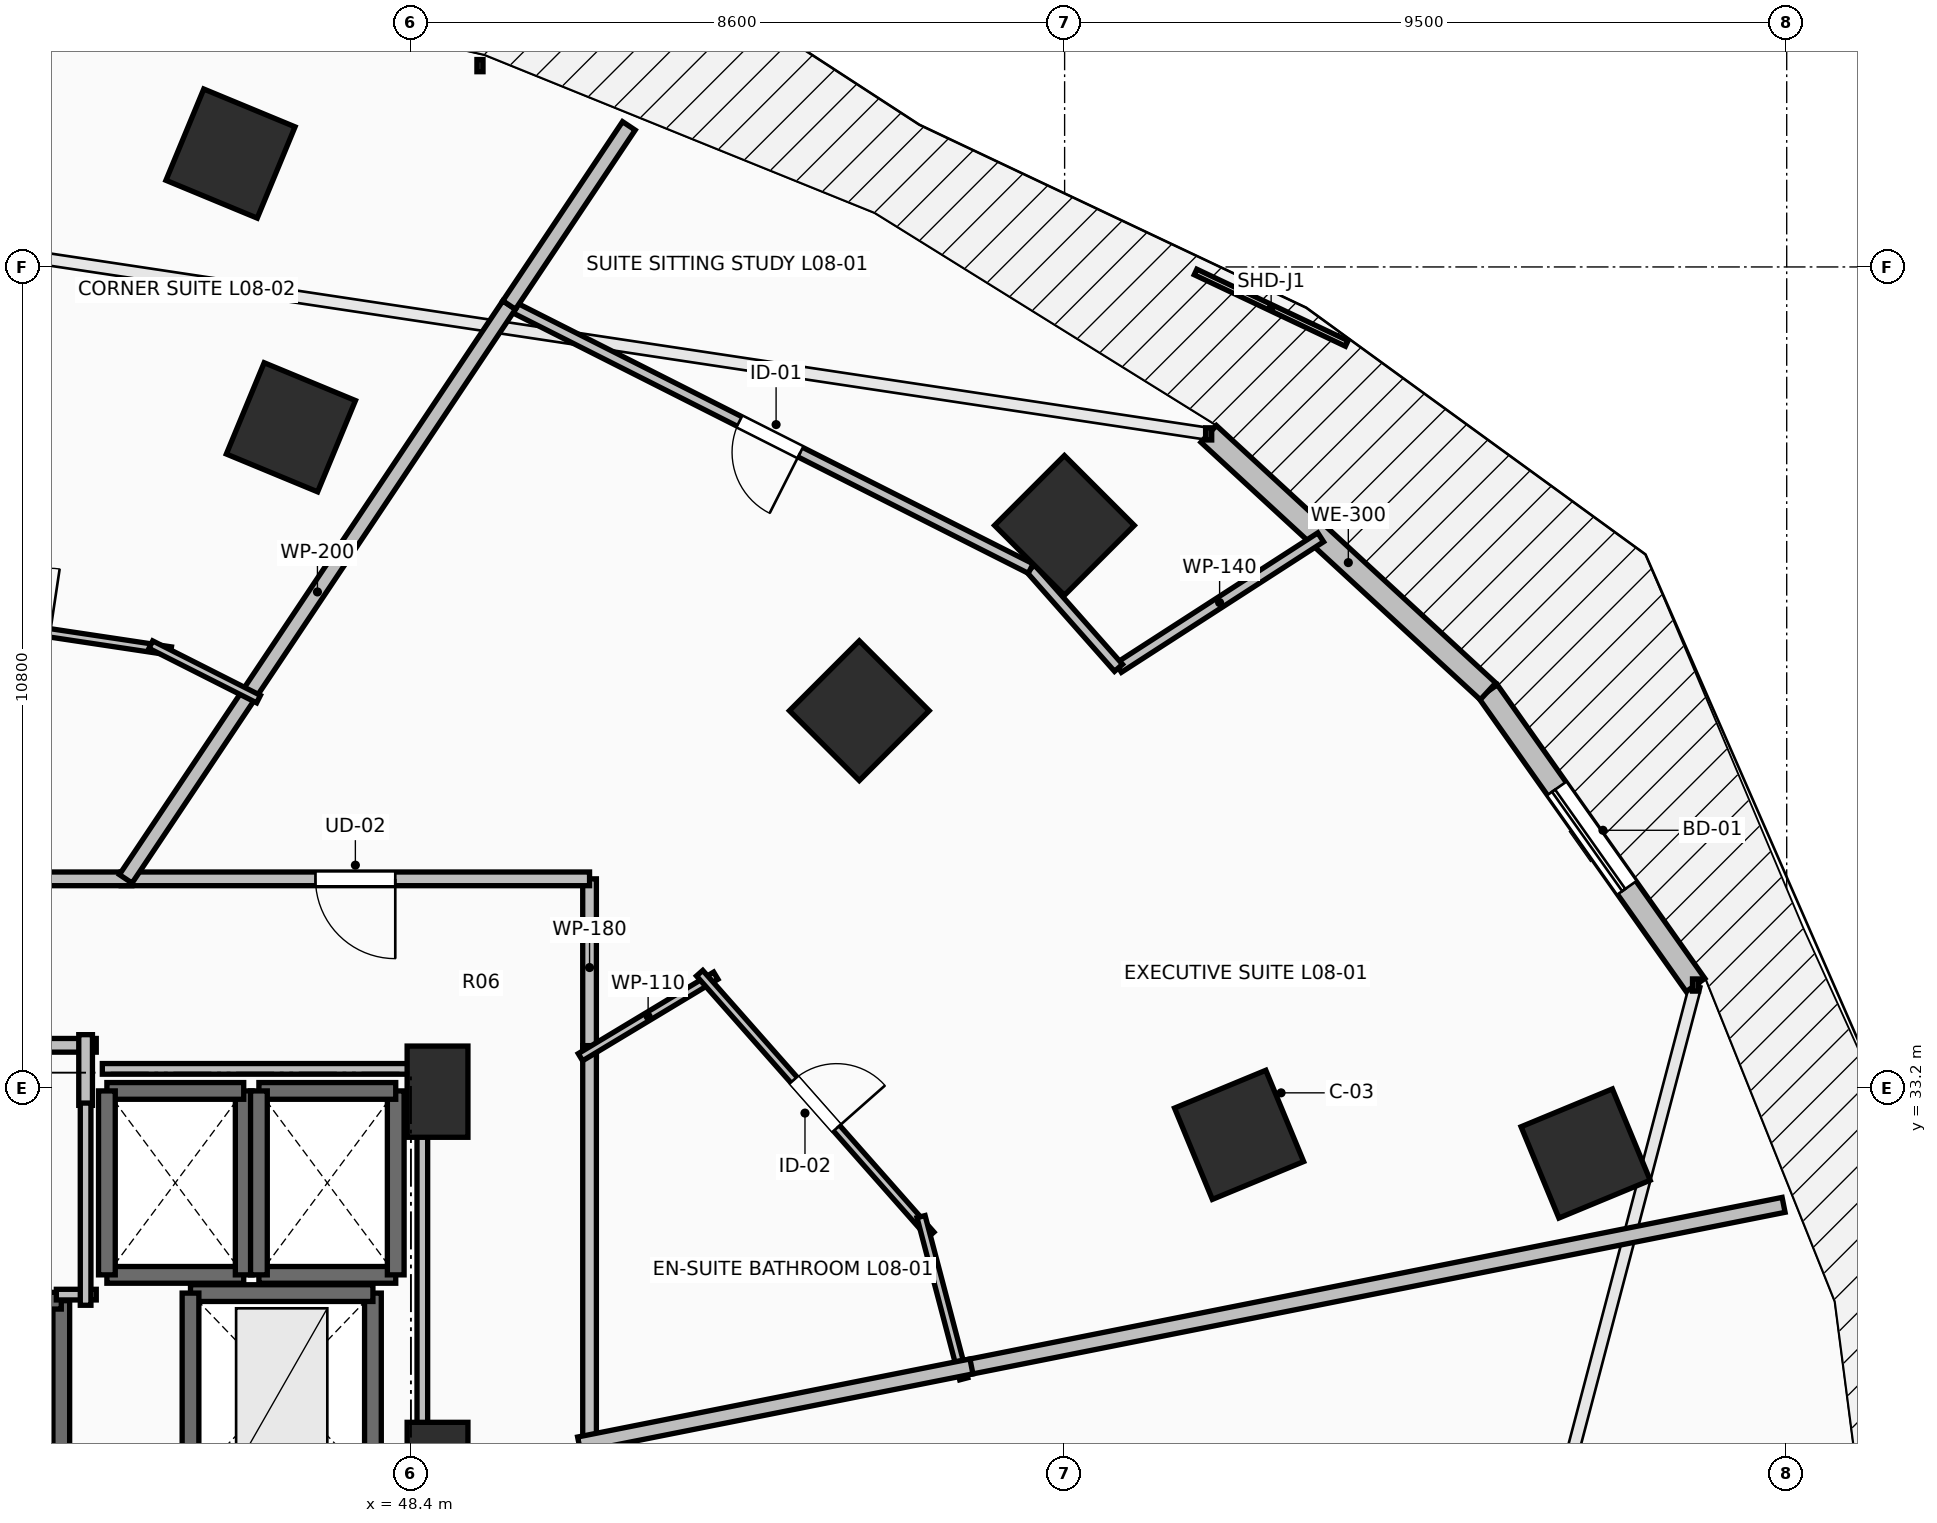
"""IFC4 building model, lengths in metres.
Left out: names, types, materials, properties, quantities, classifications, styles, units other than length and angle.
Written with IfcOpenShell. Run it as: python <this file> out.ifc"""

import sys

from ifc_helpers import new_model, si_unit, direction, frame, frame_2d, origin, origin_2d, place, context, subcontext, project, spatial, rectangle, extrude, element, fill, save


model = new_model("IFC4")
c1 = context("Model", 3, precision=1e-05, world=origin(), true_north=direction((0.0, 1.0)))
c2 = subcontext(c1, "Body", "Model", "MODEL_VIEW")
j1 = project(units=[si_unit("LENGTHUNIT", "METRE"), si_unit("PLANEANGLEUNIT", "RADIAN")], contexts=[c1])
p1 = place(None, origin())
s1 = spatial("IfcSite", under=j1, at=p1, CompositionType="ELEMENT")
p2 = place(p1, origin())
s2 = spatial("IfcBuilding", under=s1, at=p2, CompositionType="ELEMENT")
p3 = place(p2, frame((0.0, 0.0, 34.5)))
s3 = spatial("IfcBuildingStorey", under=s2, at=p3, CompositionType="ELEMENT", Elevation=34.5)
for number, where, z_axis, x_axis in (
    (1, (59.295, 32.582, 0.0), (0.0, 0.0, 1.0), (0.924, 0.383, 0.0)),
    (2, (54.299, 38.162, 0.0), (0.0, 0.0, 1.0), (0.707, 0.707, 0.0)),
    (3, (46.821, 41.891, 0.0), (0.0, 0.0, 1.0), (0.383, 0.924, 0.0)),
    (4, (63.854, 32.337, 0.0), (0.0, 0.0, 1.0), (0.924, 0.383, 0.0)),
    (5, (56.997, 40.6, 0.0), (0.0, 0.0, 1.0), (0.707, 0.707, 0.0)),
    (6, (46.026, 45.492, 0.0), (0.0, 0.0, 1.0), (0.383, 0.924, 0.0)),
):
    element("IfcColumn", number, at=place(p3, frame(where, z_axis=z_axis, x_axis=x_axis)), inside=s3, PredefinedType="COLUMN", context=c2, shape_type="SweptSolid", body=[
        extrude(rectangle(XDim=1.3, YDim=1.3, at=origin_2d()), origin(), (0.0, 0.0, 1.0), 3.5),
    ])
for number, where, z_axis, x_axis in (
    (7, (48.75, 33.15, 0.0), (0.0, 0.0, 1.0), (1.0, 0.0, 0.0)),
    (8, (48.75, 28.2, 0.0), (0.0, 0.0, 1.0), (1.0, 0.0, 0.0)),
):
    element("IfcColumn", number, at=place(p3, frame(where, z_axis=z_axis, x_axis=x_axis)), inside=s3, PredefinedType="PILASTER", context=c2, shape_type="SweptSolid", body=[
        extrude(rectangle(XDim=0.8, YDim=1.2, at=origin_2d()), origin(), (0.0, 0.0, 1.0), 3.5),
    ])
p4 = place(p3, frame((65.301, 34.553, 0.0), z_axis=(0.0, 0.0, 1.0), x_axis=(-0.577130815624, 0.816651713803, 0.0)))
e9 = element("IfcWall", 9, at=p4, inside=s3, PredefinedType="STANDARD", context=c2, shape_type="SweptSolid", body=[
    extrude(rectangle(XDim=4.731, YDim=0.3, at=frame_2d((2.366, 0.0))), origin(), (0.0, 0.0, 1.0), 3.24),
])
p5 = place(p4, frame((1.566, 0.0, 0.0)))
e10 = element("IfcOpeningElement", 10, at=p5, cuts=e9, PredefinedType="OPENING", context=c2, shape_type="SweptSolid", body=[
    extrude(rectangle(XDim=1.6, YDim=2.3, at=frame_2d((0.8, 1.15))), frame((0.0, 0.165, 0.0), z_axis=(0.0, -1.0, 0.0), x_axis=(1.0, 0.0, 0.0)), (0.0, 0.0, 1.0), 0.33),
])
p6 = place(p3, frame((62.57, 38.417, 0.0), z_axis=(0.0, 0.0, 1.0), x_axis=(-0.735342629635, 0.677695519419, 0.0)))
e11 = element("IfcWall", 11, at=p6, inside=s3, PredefinedType="STANDARD", context=c2, shape_type="SweptSolid", body=[
    extrude(rectangle(XDim=4.997, YDim=0.3, at=frame_2d((2.499, 0.0))), origin(), (0.0, 0.0, 1.0), 3.24),
])
p7 = place(p3, frame((43.8, 27.8, 0.0), z_axis=(0.0, 0.0, 1.0), x_axis=(0.0, 1.0, 0.0)))
e12 = element("IfcWall", 12, at=p7, inside=s3, PredefinedType="SOLIDWALL", context=c2, shape_type="SweptSolid", body=[
    extrude(rectangle(XDim=2.6, YDim=0.22, at=frame_2d((1.3, 0.0))), origin(), (0.0, 0.0, 1.0), 3.24),
])
p8 = place(p3, frame((43.8, 30.4, 0.0), z_axis=(0.0, 0.0, 1.0), x_axis=(-1.0, 0.0, 0.0)))
e13 = element("IfcWall", 13, at=p8, inside=s3, PredefinedType="SOLIDWALL", context=c2, shape_type="SweptSolid", body=[
    extrude(rectangle(XDim=2.2, YDim=0.22, at=frame_2d((1.1, 0.0))), origin(), (0.0, 0.0, 1.0), 3.24),
])
p9 = place(p3, frame((44.4, 30.74, 0.0), z_axis=(0.0, 0.0, 1.0), x_axis=(1.0, 0.0, 0.0)))
e14 = element("IfcWall", 14, at=p9, inside=s3, PredefinedType="SOLIDWALL", context=c2, shape_type="SweptSolid", body=[
    extrude(rectangle(XDim=1.8, YDim=0.22, at=frame_2d((0.9, 0.0))), origin(), (0.0, 0.0, 1.0), 3.24),
])
p10 = place(p3, frame((46.2, 30.74, 0.0), z_axis=(0.0, 0.0, 1.0), x_axis=(0.0, 1.0, 0.0)))
e15 = element("IfcWall", 15, at=p10, inside=s3, PredefinedType="SOLIDWALL", context=c2, shape_type="SweptSolid", body=[
    extrude(rectangle(XDim=2.42, YDim=0.22, at=frame_2d((1.21, 0.0))), origin(), (0.0, 0.0, 1.0), 3.24),
])
p11 = place(p3, frame((46.2, 33.16, 0.0), z_axis=(0.0, 0.0, 1.0), x_axis=(-1.0, 0.0, 0.0)))
e16 = element("IfcWall", 16, at=p11, inside=s3, PredefinedType="SOLIDWALL", context=c2, shape_type="SweptSolid", body=[
    extrude(rectangle(XDim=1.8, YDim=0.22, at=frame_2d((0.9, 0.0))), origin(), (0.0, 0.0, 1.0), 3.24),
])
p12 = place(p3, frame((44.4, 33.16, 0.0), z_axis=(0.0, 0.0, 1.0), x_axis=(0.0, -1.0, 0.0)))
e17 = element("IfcWall", 17, at=p12, inside=s3, PredefinedType="SOLIDWALL", context=c2, shape_type="SweptSolid", body=[
    extrude(rectangle(XDim=2.42, YDim=0.22, at=frame_2d((1.21, 0.0))), origin(), (0.0, 0.0, 1.0), 3.24),
])
p13 = place(p3, frame((46.4, 30.74, 0.0), z_axis=(0.0, 0.0, 1.0), x_axis=(1.0, 0.0, 0.0)))
e18 = element("IfcWall", 18, at=p13, inside=s3, PredefinedType="SOLIDWALL", context=c2, shape_type="SweptSolid", body=[
    extrude(rectangle(XDim=1.8, YDim=0.22, at=frame_2d((0.9, 0.0))), origin(), (0.0, 0.0, 1.0), 3.24),
])
p14 = place(p3, frame((48.2, 30.74, 0.0), z_axis=(0.0, 0.0, 1.0), x_axis=(0.0, 1.0, 0.0)))
e19 = element("IfcWall", 19, at=p14, inside=s3, PredefinedType="SOLIDWALL", context=c2, shape_type="SweptSolid", body=[
    extrude(rectangle(XDim=2.42, YDim=0.22, at=frame_2d((1.21, 0.0))), origin(), (0.0, 0.0, 1.0), 3.24),
])
p15 = place(p3, frame((48.2, 33.16, 0.0), z_axis=(0.0, 0.0, 1.0), x_axis=(-1.0, 0.0, 0.0)))
e20 = element("IfcWall", 20, at=p15, inside=s3, PredefinedType="SOLIDWALL", context=c2, shape_type="SweptSolid", body=[
    extrude(rectangle(XDim=1.8, YDim=0.22, at=frame_2d((0.9, 0.0))), origin(), (0.0, 0.0, 1.0), 3.24),
])
p16 = place(p3, frame((46.4, 33.16, 0.0), z_axis=(0.0, 0.0, 1.0), x_axis=(0.0, -1.0, 0.0)))
e21 = element("IfcWall", 21, at=p16, inside=s3, PredefinedType="SOLIDWALL", context=c2, shape_type="SweptSolid", body=[
    extrude(rectangle(XDim=2.42, YDim=0.22, at=frame_2d((1.21, 0.0))), origin(), (0.0, 0.0, 1.0), 3.24),
])
p17 = place(p3, frame((47.9, 28.0, 0.0), z_axis=(0.0, 0.0, 1.0), x_axis=(0.0, 1.0, 0.0)))
e22 = element("IfcWall", 22, at=p17, inside=s3, PredefinedType="SHEAR", context=c2, shape_type="SweptSolid", body=[
    extrude(rectangle(XDim=2.5, YDim=0.22, at=frame_2d((1.25, 0.0))), origin(), (0.0, 0.0, 1.0), 3.24),
])
p18 = place(p3, frame((47.9, 30.5, 0.0), z_axis=(0.0, 0.0, 1.0), x_axis=(-1.0, 0.0, 0.0)))
e23 = element("IfcWall", 23, at=p18, inside=s3, PredefinedType="SHEAR", context=c2, shape_type="SweptSolid", body=[
    extrude(rectangle(XDim=2.4, YDim=0.22, at=frame_2d((1.2, 0.0))), origin(), (0.0, 0.0, 1.0), 3.24),
])
p19 = place(p3, frame((45.5, 30.5, 0.0), z_axis=(0.0, 0.0, 1.0), x_axis=(0.0, -1.0, 0.0)))
e24 = element("IfcWall", 24, at=p19, inside=s3, PredefinedType="SHEAR", context=c2, shape_type="SweptSolid", body=[
    extrude(rectangle(XDim=2.5, YDim=0.22, at=frame_2d((1.25, 0.0))), origin(), (0.0, 0.0, 1.0), 3.24),
])
p20 = place(p3, frame((44.26, 33.76, 0.0), z_axis=(0.0, 0.0, 1.0), x_axis=(-1.0, 0.0, 0.0)))
e25 = element("IfcWall", 25, at=p20, inside=s3, PredefinedType="PARTITIONING", context=c2, shape_type="SweptSolid", body=[
    extrude(rectangle(XDim=6.91, YDim=0.18, at=frame_2d((3.455, 0.0))), origin(), (0.0, 0.0, 1.0), 3.24),
])
p21 = place(p20, frame((3.03, 0.0, 0.0)))
e26 = element("IfcOpeningElement", 26, at=p21, cuts=e25, PredefinedType="OPENING", context=c2, shape_type="SweptSolid", body=[
    extrude(rectangle(XDim=0.85, YDim=2.1, at=frame_2d((0.425, 1.05))), frame((0.0, 0.105, 0.0), z_axis=(0.0, -1.0, 0.0), x_axis=(1.0, 0.0, 0.0)), (0.0, 0.0, 1.0), 0.21),
])
p22 = place(p3, frame((44.12, 32.97, 0.0), z_axis=(0.0, 0.0, 1.0), x_axis=(0.0, 1.0, 0.0)))
e27 = element("IfcWall", 27, at=p22, inside=s3, PredefinedType="PARTITIONING", context=c2, shape_type="SweptSolid", body=[
    extrude(rectangle(XDim=0.93, YDim=0.18, at=frame_2d((0.465, 0.0))), origin(), (0.0, 0.0, 1.0), 3.24),
])
p23 = place(p3, frame((50.75, 33.616, 0.0), z_axis=(0.0, 0.0, 1.0), x_axis=(0.0, 1.0, 0.0)))
e28 = element("IfcWall", 28, at=p23, inside=s3, PredefinedType="PARTITIONING", context=c2, shape_type="SweptSolid", body=[
    extrude(rectangle(XDim=2.334, YDim=0.18, at=frame_2d((1.167, 0.0))), origin(), (0.0, 0.0, 1.0), 2.432),
])
p24 = place(p3, frame((50.75, 35.95, 0.0), z_axis=(0.0, 0.0, 1.0), x_axis=(-1.0, 0.0, 0.0)))
e29 = element("IfcWall", 29, at=p24, inside=s3, PredefinedType="PARTITIONING", context=c2, shape_type="SweptSolid", body=[
    extrude(rectangle(XDim=6.162, YDim=0.18, at=frame_2d((3.081, 0.0))), origin(), (0.0, 0.0, 1.0), 2.432),
])
p25 = place(p24, frame((2.556, 0.0, 0.0)))
e30 = element("IfcOpeningElement", 30, at=p25, cuts=e29, PredefinedType="OPENING", context=c2, shape_type="SweptSolid", body=[
    extrude(rectangle(XDim=1.05, YDim=2.2, at=frame_2d((0.525, 1.1))), frame((0.0, 0.105, 0.0), z_axis=(0.0, -1.0, 0.0), x_axis=(1.0, 0.0, 0.0)), (0.0, 0.0, 1.0), 0.21),
])
p26 = place(p3, frame((50.75, 28.336, 0.0), z_axis=(0.0, 0.0, 1.0), x_axis=(0.0, 1.0, 0.0)))
e31 = element("IfcWall", 31, at=p26, inside=s3, PredefinedType="PARTITIONING", context=c2, shape_type="SweptSolid", body=[
    extrude(rectangle(XDim=5.42, YDim=0.18, at=frame_2d((2.71, 0.0))), origin(), (0.0, 0.0, 1.0), 2.432),
])
p27 = place(p3, frame((44.728, 35.95, 0.0), z_axis=(0.0, 0.0, 1.0), x_axis=(-1.0, 0.0, 0.0)))
e32 = element("IfcWall", 32, at=p27, inside=s3, PredefinedType="PARTITIONING", context=c2, shape_type="SweptSolid", body=[
    extrude(rectangle(XDim=4.334, YDim=0.18, at=frame_2d((2.167, 0.0))), origin(), (0.0, 0.0, 1.0), 3.24),
])
p28 = place(p3, frame((50.63, 33.604, 0.0), z_axis=(0.0, 0.0, 1.0), x_axis=(0.856631627837, 0.515928535932, 0.0)))
e33 = element("IfcWall", 33, at=p28, inside=s3, PredefinedType="PARTITIONING", context=c2, shape_type="SweptSolid", body=[
    extrude(rectangle(XDim=2.079, YDim=0.11, at=frame_2d((1.04, 0.0))), origin(), (0.0, 0.0, 1.0), 3.24),
])
p29 = place(p3, frame((52.198, 34.709, 0.0), z_axis=(0.0, 0.0, 1.0), x_axis=(0.662071486681, -0.74944068913, 0.0)))
e34 = element("IfcWall", 34, at=p29, inside=s3, PredefinedType="PARTITIONING", context=c2, shape_type="SweptSolid", body=[
    extrude(rectangle(XDim=4.594, YDim=0.11, at=frame_2d((2.297, 0.0))), origin(), (0.0, 0.0, 1.0), 2.432),
])
p30 = place(p29, frame((1.872, 0.0, 0.0)))
e35 = element("IfcOpeningElement", 35, at=p30, cuts=e34, PredefinedType="OPENING", context=c2, shape_type="SweptSolid", body=[
    extrude(rectangle(XDim=0.85, YDim=2.1, at=frame_2d((0.425, 1.05))), frame((0.0, 0.07, 0.0), z_axis=(0.0, -1.0, 0.0), x_axis=(1.0, 0.0, 0.0)), (0.0, 0.0, 1.0), 0.14),
])
p31 = place(p3, frame((55.111, 31.506, 0.0), z_axis=(0.0, 0.0, 1.0), x_axis=(0.254389812051, -0.967101764823, 0.0)))
e36 = element("IfcWall", 36, at=p31, inside=s3, PredefinedType="PARTITIONING", context=c2, shape_type="SweptSolid", body=[
    extrude(rectangle(XDim=2.206, YDim=0.11, at=frame_2d((1.103, 0.0))), origin(), (0.0, 0.0, 1.0), 3.24),
])
p32 = place(p3, frame((60.369, 40.443, 0.0), z_axis=(0.0, 0.0, 1.0), x_axis=(-0.840157237287, -0.542342895809, 0.0)))
e37 = element("IfcWall", 37, at=p32, inside=s3, PredefinedType="PARTITIONING", context=c2, shape_type="SweptSolid", body=[
    extrude(rectangle(XDim=3.166, YDim=0.14, at=frame_2d((1.583, 0.0))), origin(), (0.0, 0.0, 1.0), 2.624),
])
p33 = place(p3, frame((57.709, 38.726, 0.0), z_axis=(0.0, 0.0, 1.0), x_axis=(-0.662510427818, 0.749052690425, 0.0)))
e38 = element("IfcWall", 38, at=p33, inside=s3, PredefinedType="PARTITIONING", context=c2, shape_type="SweptSolid", body=[
    extrude(rectangle(XDim=1.743, YDim=0.14, at=frame_2d((0.872, 0.0))), origin(), (0.0, 0.0, 1.0), 2.432),
])
p34 = place(p3, frame((56.554, 40.032, 0.0), z_axis=(0.0, 0.0, 1.0), x_axis=(-0.892545780062, 0.450956794487, 0.0)))
e39 = element("IfcWall", 39, at=p34, inside=s3, PredefinedType="PARTITIONING", context=c2, shape_type="SweptSolid", body=[
    extrude(rectangle(XDim=7.688, YDim=0.14, at=frame_2d((3.844, 0.0))), origin(), (0.0, 0.0, 1.0), 2.432),
])
p35 = place(p34, frame((3.394, 0.0, 0.0)))
e40 = element("IfcOpeningElement", 40, at=p35, cuts=e39, PredefinedType="OPENING", context=c2, shape_type="SweptSolid", body=[
    extrude(rectangle(XDim=0.9, YDim=2.1, at=frame_2d((0.45, 1.05))), frame((0.0, 0.085, 0.0), z_axis=(0.0, -1.0, 0.0), x_axis=(1.0, 0.0, 0.0)), (0.0, 0.0, 1.0), 0.17),
])
p36 = place(p3, frame((49.692, 43.499, 0.0), z_axis=(0.0, 0.0, 1.0), x_axis=(-0.555556259167, -0.831478949163, 0.0)))
e41 = element("IfcWall", 41, at=p36, inside=s3, PredefinedType="PARTITIONING", context=c2, shape_type="SweptSolid", body=[
    extrude(rectangle(XDim=9.079, YDim=0.2, at=frame_2d((4.54, 0.0))), origin(), (0.0, 0.0, 1.0), 2.432),
])
p37 = place(p3, frame((55.637, 29.508, 0.0), z_axis=(0.0, 0.0, 1.0), x_axis=(0.980781844691, 0.195107593712, 0.0)))
e42 = element("IfcWall", 42, at=p37, inside=s3, PredefinedType="PARTITIONING", context=c2, shape_type="SweptSolid", body=[
    extrude(rectangle(XDim=11.034, YDim=0.2, at=frame_2d((5.517, 0.0))), origin(), (0.0, 0.0, 1.0), 2.624),
])
p38 = place(p3, frame((50.613, 28.509, 0.0), z_axis=(0.0, 0.0, 1.0), x_axis=(0.980788877604, 0.195072236795, 0.0)))
e43 = element("IfcWall", 43, at=p38, inside=s3, PredefinedType="PARTITIONING", context=c2, shape_type="SweptSolid", body=[
    extrude(rectangle(XDim=5.263, YDim=0.2, at=frame_2d((2.631, 0.0))), origin(), (0.0, 0.0, 1.0), 2.972),
])
p39 = place(p3, frame((51.267, 45.856, 0.0), z_axis=(0.0, 0.0, 1.0), x_axis=(-0.555653789226, -0.831413775757, 0.0)))
e44 = element("IfcWall", 44, at=p39, inside=s3, PredefinedType="PARTITIONING", context=c2, shape_type="SweptSolid", body=[
    extrude(rectangle(XDim=2.835, YDim=0.2, at=frame_2d((1.417, 0.0))), origin(), (0.0, 0.0, 1.0), 2.624),
])
p40 = place(p3, frame((41.223, 39.551, 0.0), z_axis=(0.0, 0.0, 1.0), x_axis=(0.988911221338, -0.148507899833, 0.0)))
e45 = element("IfcWall", 45, at=p40, inside=s3, PredefinedType="PARTITIONING", context=c2, shape_type="SweptSolid", body=[
    extrude(rectangle(XDim=4.064, YDim=0.11, at=frame_2d((2.032, 0.0))), origin(), (0.0, 0.0, 1.0), 3.24),
])
p41 = place(p40, frame((1.607, 0.0, 0.0)))
e46 = element("IfcOpeningElement", 46, at=p41, cuts=e45, PredefinedType="OPENING", context=c2, shape_type="SweptSolid", body=[
    extrude(rectangle(XDim=0.85, YDim=2.1, at=frame_2d((0.425, 1.05))), frame((0.0, 0.07, 0.0), z_axis=(0.0, -1.0, 0.0), x_axis=(1.0, 0.0, 0.0)), (0.0, 0.0, 1.0), 0.14),
])
p42 = place(p3, frame((44.978, 39.031, 0.0), z_axis=(0.0, 0.0, 1.0), x_axis=(0.892388427115, -0.451268096758, 0.0)))
e47 = element("IfcWall", 47, at=p42, inside=s3, PredefinedType="PARTITIONING", context=c2, shape_type="SweptSolid", body=[
    extrude(rectangle(XDim=1.588, YDim=0.11, at=frame_2d((0.794, 0.0))), origin(), (0.0, 0.0, 1.0), 3.24),
])
p43 = place(p3, frame((43.735, 30.48, 0.0), z_axis=(0.0, 0.0, 1.0), x_axis=(1.0, 0.0, 0.0)))
e48 = element("IfcWall", 48, at=p43, inside=s3, PredefinedType="PARTITIONING", context=c2, shape_type="SweptSolid", body=[
    extrude(rectangle(XDim=0.525, YDim=0.14, at=frame_2d((0.262, 0.0))), origin(), (0.0, 0.0, 1.0), 3.24),
])
p44 = place(p3, frame((44.12, 30.34, 0.0), z_axis=(0.0, 0.0, 1.0), x_axis=(0.0, 1.0, 0.0)))
e49 = element("IfcWall", 49, at=p44, inside=s3, PredefinedType="PARTITIONING", context=c2, shape_type="SweptSolid", body=[
    extrude(rectangle(XDim=2.66, YDim=0.14, at=frame_2d((1.33, 0.0))), origin(), (0.0, 0.0, 1.0), 3.24),
])
p45 = place(p3, frame((44.34, 33.45, 0.0), z_axis=(0.0, 0.0, 1.0), x_axis=(1.0, 0.0, 0.0)))
e50 = element("IfcWall", 50, at=p45, inside=s3, PredefinedType="PARTITIONING", context=c2, shape_type="SweptSolid", body=[
    extrude(rectangle(XDim=4.21, YDim=0.14, at=frame_2d((2.105, 0.0))), origin(), (0.0, 0.0, 1.0), 2.432),
])
p46 = place(p3, frame((48.55, 33.45, 0.0), z_axis=(0.0, 0.0, 1.0), x_axis=(0.0, -1.0, 0.0)))
e51 = element("IfcWall", 51, at=p46, inside=s3, PredefinedType="PARTITIONING", context=c2, shape_type="SweptSolid", body=[
    extrude(rectangle(XDim=5.254, YDim=0.14, at=frame_2d((2.627, 0.0))), origin(), (0.0, 0.0, 1.0), 2.432),
])
p47 = place(p5, origin())
e52 = element("IfcDoor", 52, at=p47, inside=s3, OperationType="SLIDING_TO_LEFT", PredefinedType="DOOR", context=c2, shape_type="SweptSolid", body=[
    extrude(rectangle(XDim=1.6, YDim=2.3, at=frame_2d((0.8, 1.15))), frame((0.0, 0.025, 0.0), z_axis=(0.0, -1.0, 0.0), x_axis=(1.0, 0.0, 0.0)), (0.0, 0.0, 1.0), 0.05),
])
fill(e10, e52)
p48 = place(p25, origin())
e53 = element("IfcDoor", 53, at=p48, inside=s3, OperationType="SINGLE_SWING_LEFT", PredefinedType="DOOR", context=c2, shape_type="SweptSolid", body=[
    extrude(rectangle(XDim=1.05, YDim=2.2, at=frame_2d((0.525, 1.1))), frame((0.0, 0.025, 0.0), z_axis=(0.0, -1.0, 0.0), x_axis=(1.0, 0.0, 0.0)), (0.0, 0.0, 1.0), 0.05),
])
fill(e30, e53)
p49 = place(p30, origin())
e54 = element("IfcDoor", 54, at=p49, inside=s3, OperationType="SINGLE_SWING_RIGHT", PredefinedType="DOOR", context=c2, shape_type="SweptSolid", body=[
    extrude(rectangle(XDim=0.85, YDim=2.1, at=frame_2d((0.425, 1.05))), frame((0.0, 0.025, 0.0), z_axis=(0.0, -1.0, 0.0), x_axis=(1.0, 0.0, 0.0)), (0.0, 0.0, 1.0), 0.05),
])
fill(e35, e54)
p50 = place(p35, origin())
e55 = element("IfcDoor", 55, at=p50, inside=s3, OperationType="SINGLE_SWING_LEFT", PredefinedType="DOOR", context=c2, shape_type="SweptSolid", body=[
    extrude(rectangle(XDim=0.9, YDim=2.1, at=frame_2d((0.45, 1.05))), frame((0.0, 0.025, 0.0), z_axis=(0.0, -1.0, 0.0), x_axis=(1.0, 0.0, 0.0)), (0.0, 0.0, 1.0), 0.05),
])
fill(e40, e55)
save(model, sys.argv[1])
